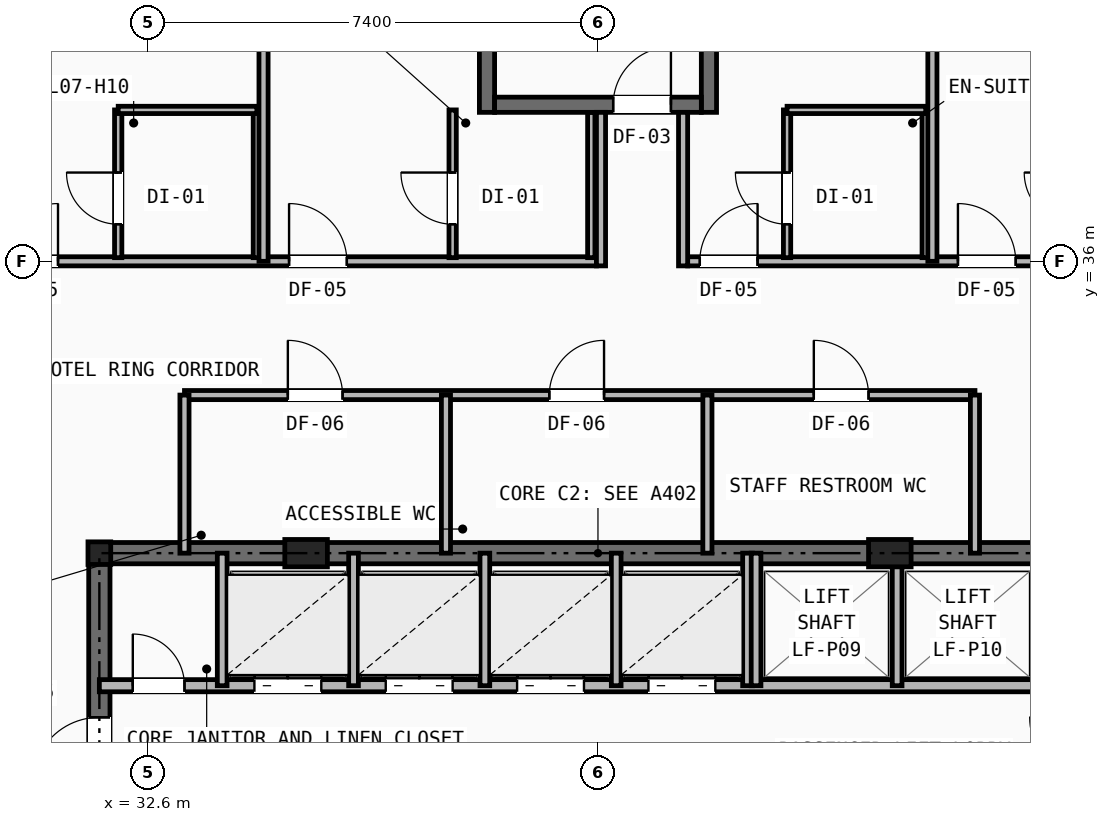
"""IFC4 building model, lengths in metres.
Left out: names, types, materials, properties, quantities, classifications, styles, units other than length and angle.
Written with IfcOpenShell. Run it as: python <this file> out.ifc"""

import sys

from ifc_helpers import new_model, si_unit, direction, frame, frame_2d, origin, origin_2d, place, context, subcontext, project, spatial, rectangle, i_section, extrude, element, fill, save


model = new_model("IFC4")
c1 = context("Model", 3, precision=1e-05, world=origin(), true_north=direction((0.0, 1.0)))
c2 = subcontext(c1, "Body", "Model", "MODEL_VIEW")
j1 = project(units=[si_unit("LENGTHUNIT", "METRE"), si_unit("PLANEANGLEUNIT", "RADIAN")], contexts=[c1])
p1 = place(None, origin())
s1 = spatial("IfcSite", under=j1, at=p1, CompositionType="ELEMENT")
p2 = place(p1, origin())
s2 = spatial("IfcBuilding", under=s1, at=p2, CompositionType="ELEMENT")
p3 = place(p2, frame((0.0, 0.0, 30.4)))
s3 = spatial("IfcBuildingStorey", under=s2, at=p3, CompositionType="ELEMENT", Elevation=30.4)
p4 = place(p3, frame((31.8, 31.2, 0.0), z_axis=(0.0, 0.0, 1.0), x_axis=(1.0, 0.0, 0.0)))
e1 = element("IfcColumn", 1, at=p4, inside=s3, PredefinedType="COLUMN", context=c2, shape_type="SweptSolid", body=[
    extrude(i_section(OverallWidth=0.374, OverallDepth=0.372, WebThickness=0.016, FlangeThickness=0.026, at=origin_2d()), origin(), (0.0, 0.0, 1.0), 3.2),
])
for number, where, z_axis, x_axis in (
    (2, (35.2, 31.2, 0.0), (0.0, 0.0, 1.0), (1.0, 0.0, 0.0)),
    (3, (44.8, 31.2, 0.0), (0.0, 0.0, 1.0), (1.0, 0.0, 0.0)),
):
    element("IfcColumn", number, at=place(p3, frame(where, z_axis=z_axis, x_axis=x_axis)), inside=s3, PredefinedType="PILASTER", context=c2, shape_type="SweptSolid", body=[
        extrude(rectangle(XDim=0.7, YDim=0.45, at=origin_2d()), origin(), (0.0, 0.0, 1.0), 3.2),
    ])
p5 = place(p3, frame((31.8, 31.2, 0.0), z_axis=(0.0, 0.0, 1.0), x_axis=(1.0, 0.0, 0.0)))
e4 = element("IfcWall", 4, at=p5, inside=s3, PredefinedType="SHEAR", context=c2, shape_type="SweptSolid", body=[
    extrude(rectangle(XDim=16.4, YDim=0.35, at=frame_2d((8.2, 0.0))), origin(), (0.0, 0.0, 1.0), 2.98),
])
p6 = place(p3, frame((31.8, 16.4, 0.0), z_axis=(0.0, 0.0, 1.0), x_axis=(0.0, 1.0, 0.0)))
e5 = element("IfcWall", 5, at=p6, inside=s3, PredefinedType="SHEAR", context=c2, shape_type="SweptSolid", body=[
    extrude(rectangle(XDim=14.8, YDim=0.35, at=frame_2d((7.4, 0.0))), origin(), (0.0, 0.0, 1.0), 2.98),
])
p7 = place(p6, frame((11.0, 0.0, 0.0)))
e6 = element("IfcOpeningElement", 6, at=p7, cuts=e5, PredefinedType="OPENING", context=c2, shape_type="SweptSolid", body=[
    extrude(rectangle(XDim=1.1, YDim=2.15, at=frame_2d((0.55, 1.075))), frame((0.0, 0.185, 0.0), z_axis=(0.0, -1.0, 0.0), x_axis=(1.0, 0.0, 0.0)), (0.0, 0.0, 1.0), 0.37),
])
p8 = place(p3, frame((31.8, 29.02, 0.0), z_axis=(0.0, 0.0, 1.0), x_axis=(1.0, 0.0, 0.0)))
e7 = element("IfcWall", 7, at=p8, inside=s3, PredefinedType="SOLIDWALL", context=c2, shape_type="SweptSolid", body=[
    extrude(rectangle(XDim=16.4, YDim=0.2, at=frame_2d((8.2, 0.0))), origin(), (0.0, 0.0, 1.0), 2.431),
])
p9 = place(p8, frame((0.55, 0.0, 0.0)))
e8 = element("IfcOpeningElement", 8, at=p9, cuts=e7, PredefinedType="OPENING", context=c2, shape_type="SweptSolid", body=[
    extrude(rectangle(XDim=0.85, YDim=2.05, at=frame_2d((0.425, 1.025))), frame((0.0, 0.11, 0.0), z_axis=(0.0, -1.0, 0.0), x_axis=(1.0, 0.0, 0.0)), (0.0, 0.0, 1.0), 0.22),
])
p10 = place(p8, frame((2.55, 0.0, 0.0)))
e9 = element("IfcOpeningElement", 9, at=p10, cuts=e7, PredefinedType="OPENING", context=c2, shape_type="SweptSolid", body=[
    extrude(rectangle(XDim=1.1, YDim=2.15, at=frame_2d((0.55, 1.075))), frame((0.0, 0.11, 0.0), z_axis=(0.0, -1.0, 0.0), x_axis=(1.0, 0.0, 0.0)), (0.0, 0.0, 1.0), 0.22),
])
p11 = place(p8, frame((4.71, 0.0, 0.0)))
e10 = element("IfcOpeningElement", 10, at=p11, cuts=e7, PredefinedType="OPENING", context=c2, shape_type="SweptSolid", body=[
    extrude(rectangle(XDim=1.1, YDim=2.15, at=frame_2d((0.55, 1.075))), frame((0.0, 0.11, 0.0), z_axis=(0.0, -1.0, 0.0), x_axis=(1.0, 0.0, 0.0)), (0.0, 0.0, 1.0), 0.22),
])
p12 = place(p8, frame((6.87, 0.0, 0.0)))
e11 = element("IfcOpeningElement", 11, at=p12, cuts=e7, PredefinedType="OPENING", context=c2, shape_type="SweptSolid", body=[
    extrude(rectangle(XDim=1.1, YDim=2.15, at=frame_2d((0.55, 1.075))), frame((0.0, 0.11, 0.0), z_axis=(0.0, -1.0, 0.0), x_axis=(1.0, 0.0, 0.0)), (0.0, 0.0, 1.0), 0.22),
])
p13 = place(p8, frame((9.03, 0.0, 0.0)))
e12 = element("IfcOpeningElement", 12, at=p13, cuts=e7, PredefinedType="OPENING", context=c2, shape_type="SweptSolid", body=[
    extrude(rectangle(XDim=1.1, YDim=2.15, at=frame_2d((0.55, 1.075))), frame((0.0, 0.11, 0.0), z_axis=(0.0, -1.0, 0.0), x_axis=(1.0, 0.0, 0.0)), (0.0, 0.0, 1.0), 0.22),
])
for number, where, z_axis, x_axis in (
    (13, (33.82, 29.02, 0.0), (0.0, 0.0, 1.0), (0.0, 1.0, 0.0)),
    (14, (35.98, 29.02, 0.0), (0.0, 0.0, 1.0), (0.0, 1.0, 0.0)),
    (15, (38.14, 29.02, 0.0), (0.0, 0.0, 1.0), (0.0, 1.0, 0.0)),
    (16, (40.3, 29.02, 0.0), (0.0, 0.0, 1.0), (0.0, 1.0, 0.0)),
    (17, (42.46, 29.02, 0.0), (0.0, 0.0, 1.0), (0.0, 1.0, 0.0)),
    (18, (42.6, 29.02, 0.0), (0.0, 0.0, 1.0), (0.0, 1.0, 0.0)),
    (19, (44.92, 29.02, 0.0), (0.0, 0.0, 1.0), (0.0, 1.0, 0.0)),
):
    element("IfcWall", number, at=place(p3, frame(where, z_axis=z_axis, x_axis=x_axis)), inside=s3, PredefinedType="SOLIDWALL", context=c2, shape_type="SweptSolid", body=[
        extrude(rectangle(XDim=2.18, YDim=0.16, at=frame_2d((1.09, 0.0))), origin(), (0.0, 0.0, 1.0), 2.431),
    ])
p14 = place(p3, frame((33.2, 33.8, 0.0), z_axis=(0.0, 0.0, 1.0), x_axis=(1.0, 0.0, 0.0)))
e20 = element("IfcWall", 20, at=p14, inside=s3, PredefinedType="PARTITIONING", context=c2, shape_type="SweptSolid", body=[
    extrude(rectangle(XDim=13.0, YDim=0.15, at=frame_2d((6.5, 0.0))), origin(), (0.0, 0.0, 1.0), 2.98),
])
p15 = place(p14, frame((1.7, 0.0, 0.0)))
e21 = element("IfcOpeningElement", 21, at=p15, cuts=e20, PredefinedType="OPENING", context=c2, shape_type="SweptSolid", body=[
    extrude(rectangle(XDim=0.9, YDim=2.1, at=frame_2d((0.45, 1.05))), frame((0.0, 0.085, 0.0), z_axis=(0.0, -1.0, 0.0), x_axis=(1.0, 0.0, 0.0)), (0.0, 0.0, 1.0), 0.17),
])
p16 = place(p14, frame((6.0, 0.0, 0.0)))
e22 = element("IfcOpeningElement", 22, at=p16, cuts=e20, PredefinedType="OPENING", context=c2, shape_type="SweptSolid", body=[
    extrude(rectangle(XDim=0.9, YDim=2.1, at=frame_2d((0.45, 1.05))), frame((0.0, 0.085, 0.0), z_axis=(0.0, -1.0, 0.0), x_axis=(1.0, 0.0, 0.0)), (0.0, 0.0, 1.0), 0.17),
])
p17 = place(p14, frame((10.35, 0.0, 0.0)))
e23 = element("IfcOpeningElement", 23, at=p17, cuts=e20, PredefinedType="OPENING", context=c2, shape_type="SweptSolid", body=[
    extrude(rectangle(XDim=0.9, YDim=2.1, at=frame_2d((0.45, 1.05))), frame((0.0, 0.085, 0.0), z_axis=(0.0, -1.0, 0.0), x_axis=(1.0, 0.0, 0.0)), (0.0, 0.0, 1.0), 0.17),
])
for number, where, z_axis, x_axis in (
    (24, (33.2, 31.2, 0.0), (0.0, 0.0, 1.0), (0.0, 1.0, 0.0)),
    (25, (46.2, 31.2, 0.0), (0.0, 0.0, 1.0), (0.0, 1.0, 0.0)),
    (26, (37.5, 31.2, 0.0), (0.0, 0.0, 1.0), (0.0, 1.0, 0.0)),
    (27, (41.8, 31.2, 0.0), (0.0, 0.0, 1.0), (0.0, 1.0, 0.0)),
):
    element("IfcWall", number, at=place(p3, frame(where, z_axis=z_axis, x_axis=x_axis)), inside=s3, PredefinedType="PARTITIONING", context=c2, shape_type="SweptSolid", body=[
        extrude(rectangle(XDim=2.6, YDim=0.15, at=frame_2d((1.3, 0.0))), origin(), (0.0, 0.0, 1.0), 2.431),
    ])
p18 = place(p3, frame((29.6, 36.0, 0.0), z_axis=(0.0, 0.0, 1.0), x_axis=(1.0, 0.0, 0.0)))
e28 = element("IfcWall", 28, at=p18, inside=s3, PredefinedType="PARTITIONING", context=c2, shape_type="SweptSolid", body=[
    extrude(rectangle(XDim=10.375, YDim=0.15, at=frame_2d((5.188, 0.0))), origin(), (0.0, 0.0, 1.0), 2.98),
])
p19 = place(p18, frame((0.57, 0.0, 0.0)))
e29 = element("IfcOpeningElement", 29, at=p19, cuts=e28, PredefinedType="OPENING", context=c2, shape_type="SweptSolid", body=[
    extrude(rectangle(XDim=0.95, YDim=2.1, at=frame_2d((0.475, 1.05))), frame((0.0, 0.085, 0.0), z_axis=(0.0, -1.0, 0.0), x_axis=(1.0, 0.0, 0.0)), (0.0, 0.0, 1.0), 0.17),
])
p20 = place(p18, frame((5.32, 0.0, 0.0)))
e30 = element("IfcOpeningElement", 30, at=p20, cuts=e28, PredefinedType="OPENING", context=c2, shape_type="SweptSolid", body=[
    extrude(rectangle(XDim=0.95, YDim=2.1, at=frame_2d((0.475, 1.05))), frame((0.0, 0.085, 0.0), z_axis=(0.0, -1.0, 0.0), x_axis=(1.0, 0.0, 0.0)), (0.0, 0.0, 1.0), 0.17),
])
p21 = place(p3, frame((41.475, 36.0, 0.0), z_axis=(0.0, 0.0, 1.0), x_axis=(1.0, 0.0, 0.0)))
e31 = element("IfcWall", 31, at=p21, inside=s3, PredefinedType="PARTITIONING", context=c2, shape_type="SweptSolid", body=[
    extrude(rectangle(XDim=8.925, YDim=0.15, at=frame_2d((4.462, 0.0))), origin(), (0.0, 0.0, 1.0), 2.513),
])
p22 = place(p21, frame((0.2, 0.0, 0.0)))
e32 = element("IfcOpeningElement", 32, at=p22, cuts=e31, PredefinedType="OPENING", context=c2, shape_type="SweptSolid", body=[
    extrude(rectangle(XDim=0.95, YDim=2.1, at=frame_2d((0.475, 1.05))), frame((0.0, 0.085, 0.0), z_axis=(0.0, -1.0, 0.0), x_axis=(1.0, 0.0, 0.0)), (0.0, 0.0, 1.0), 0.17),
])
p23 = place(p21, frame((4.445, 0.0, 0.0)))
e33 = element("IfcOpeningElement", 33, at=p23, cuts=e31, PredefinedType="OPENING", context=c2, shape_type="SweptSolid", body=[
    extrude(rectangle(XDim=0.95, YDim=2.1, at=frame_2d((0.475, 1.05))), frame((0.0, 0.085, 0.0), z_axis=(0.0, -1.0, 0.0), x_axis=(1.0, 0.0, 0.0)), (0.0, 0.0, 1.0), 0.17),
])
p24 = place(p3, frame((32.11, 36.06, 0.0), z_axis=(0.0, 0.0, 1.0), x_axis=(0.0, 1.0, 0.0)))
e34 = element("IfcWall", 34, at=p24, inside=s3, PredefinedType="PARTITIONING", context=c2, shape_type="SweptSolid", body=[
    extrude(rectangle(XDim=2.43, YDim=0.12, at=frame_2d((1.215, 0.0))), origin(), (0.0, 0.0, 1.0), 2.98),
])
p25 = place(p24, frame((0.55, 0.0, 0.0)))
e35 = element("IfcOpeningElement", 35, at=p25, cuts=e34, PredefinedType="OPENING", context=c2, shape_type="SweptSolid", body=[
    extrude(rectangle(XDim=0.85, YDim=2.05, at=frame_2d((0.425, 1.025))), frame((0.0, 0.07, 0.0), z_axis=(0.0, -1.0, 0.0), x_axis=(1.0, 0.0, 0.0)), (0.0, 0.0, 1.0), 0.14),
])
p26 = place(p3, frame((34.39, 36.06, 0.0), z_axis=(0.0, 0.0, 1.0), x_axis=(0.0, 1.0, 0.0)))
e36 = element("IfcWall", 36, at=p26, inside=s3, PredefinedType="PARTITIONING", context=c2, shape_type="SweptSolid", body=[
    extrude(rectangle(XDim=2.43, YDim=0.12, at=frame_2d((1.215, 0.0))), origin(), (0.0, 0.0, 1.0), 2.98),
])
p27 = place(p3, frame((32.11, 38.49, 0.0), z_axis=(0.0, 0.0, 1.0), x_axis=(1.0, 0.0, 0.0)))
e37 = element("IfcWall", 37, at=p27, inside=s3, PredefinedType="PARTITIONING", context=c2, shape_type="SweptSolid", body=[
    extrude(rectangle(XDim=2.28, YDim=0.12, at=frame_2d((1.14, 0.0))), origin(), (0.0, 0.0, 1.0), 2.98),
])
p28 = place(p3, frame((34.5, 36.0, 0.0), z_axis=(0.0, 0.0, 1.0), x_axis=(0.0, 1.0, 0.0)))
e38 = element("IfcWall", 38, at=p28, inside=s3, PredefinedType="PARTITIONING", context=c2, shape_type="SweptSolid", body=[
    extrude(rectangle(XDim=17.66, YDim=0.15, at=frame_2d((8.83, 0.0))), origin(), (0.0, 0.0, 1.0), 2.268),
])
p29 = place(p3, frame((37.61, 36.06, 0.0), z_axis=(0.0, 0.0, 1.0), x_axis=(0.0, 1.0, 0.0)))
e39 = element("IfcWall", 39, at=p29, inside=s3, PredefinedType="PARTITIONING", context=c2, shape_type="SweptSolid", body=[
    extrude(rectangle(XDim=2.43, YDim=0.12, at=frame_2d((1.215, 0.0))), origin(), (0.0, 0.0, 1.0), 2.98),
])
p30 = place(p29, frame((0.55, 0.0, 0.0)))
e40 = element("IfcOpeningElement", 40, at=p30, cuts=e39, PredefinedType="OPENING", context=c2, shape_type="SweptSolid", body=[
    extrude(rectangle(XDim=0.85, YDim=2.05, at=frame_2d((0.425, 1.025))), frame((0.0, 0.07, 0.0), z_axis=(0.0, -1.0, 0.0), x_axis=(1.0, 0.0, 0.0)), (0.0, 0.0, 1.0), 0.14),
])
p31 = place(p3, frame((39.89, 36.06, 0.0), z_axis=(0.0, 0.0, 1.0), x_axis=(0.0, 1.0, 0.0)))
e41 = element("IfcWall", 41, at=p31, inside=s3, PredefinedType="PARTITIONING", context=c2, shape_type="SweptSolid", body=[
    extrude(rectangle(XDim=2.39, YDim=0.12, at=frame_2d((1.195, 0.0))), origin(), (0.0, 0.0, 1.0), 2.98),
])
p32 = place(p3, frame((43.11, 36.06, 0.0), z_axis=(0.0, 0.0, 1.0), x_axis=(0.0, 1.0, 0.0)))
e42 = element("IfcWall", 42, at=p32, inside=s3, PredefinedType="PARTITIONING", context=c2, shape_type="SweptSolid", body=[
    extrude(rectangle(XDim=2.43, YDim=0.12, at=frame_2d((1.215, 0.0))), origin(), (0.0, 0.0, 1.0), 2.98),
])
p33 = place(p32, frame((0.55, 0.0, 0.0)))
e43 = element("IfcOpeningElement", 43, at=p33, cuts=e42, PredefinedType="OPENING", context=c2, shape_type="SweptSolid", body=[
    extrude(rectangle(XDim=0.85, YDim=2.05, at=frame_2d((0.425, 1.025))), frame((0.0, 0.07, 0.0), z_axis=(0.0, -1.0, 0.0), x_axis=(1.0, 0.0, 0.0)), (0.0, 0.0, 1.0), 0.14),
])
p34 = place(p3, frame((45.39, 36.06, 0.0), z_axis=(0.0, 0.0, 1.0), x_axis=(0.0, 1.0, 0.0)))
e44 = element("IfcWall", 44, at=p34, inside=s3, PredefinedType="PARTITIONING", context=c2, shape_type="SweptSolid", body=[
    extrude(rectangle(XDim=2.43, YDim=0.12, at=frame_2d((1.215, 0.0))), origin(), (0.0, 0.0, 1.0), 2.98),
])
p35 = place(p3, frame((43.11, 38.49, 0.0), z_axis=(0.0, 0.0, 1.0), x_axis=(1.0, 0.0, 0.0)))
e45 = element("IfcWall", 45, at=p35, inside=s3, PredefinedType="PARTITIONING", context=c2, shape_type="SweptSolid", body=[
    extrude(rectangle(XDim=2.28, YDim=0.12, at=frame_2d((1.14, 0.0))), origin(), (0.0, 0.0, 1.0), 2.98),
])
p36 = place(p3, frame((45.5, 36.0, 0.0), z_axis=(0.0, 0.0, 1.0), x_axis=(0.0, 1.0, 0.0)))
e46 = element("IfcWall", 46, at=p36, inside=s3, PredefinedType="PARTITIONING", context=c2, shape_type="SweptSolid", body=[
    extrude(rectangle(XDim=17.66, YDim=0.15, at=frame_2d((8.83, 0.0))), origin(), (0.0, 0.0, 1.0), 2.268),
])
for number, where, z_axis, x_axis in (
    (47, (38.175, 38.45, 0.0), (0.0, 0.0, 1.0), (0.0, 1.0, 0.0)),
    (48, (41.825, 38.45, 0.0), (0.0, 0.0, 1.0), (0.0, 1.0, 0.0)),
):
    element("IfcWall", number, at=place(p3, frame(where, z_axis=z_axis, x_axis=x_axis)), inside=s3, PredefinedType="SHEAR", context=c2, shape_type="SweptSolid", body=[
        extrude(rectangle(XDim=8.55, YDim=0.25, at=frame_2d((4.275, 0.0))), origin(), (0.0, 0.0, 1.0), 2.98),
    ])
p37 = place(p3, frame((38.3, 38.575, 0.0), z_axis=(0.0, 0.0, 1.0), x_axis=(1.0, 0.0, 0.0)))
e49 = element("IfcWall", 49, at=p37, inside=s3, PredefinedType="SHEAR", context=c2, shape_type="SweptSolid", body=[
    extrude(rectangle(XDim=3.4, YDim=0.25, at=frame_2d((1.7, 0.0))), origin(), (0.0, 0.0, 1.0), 2.98),
])
p38 = place(p37, frame((1.95, 0.0, 0.0)))
e50 = element("IfcOpeningElement", 50, at=p38, cuts=e49, PredefinedType="OPENING", context=c2, shape_type="SweptSolid", body=[
    extrude(rectangle(XDim=0.95, YDim=2.1, at=frame_2d((0.475, 1.05))), frame((0.0, 0.135, 0.0), z_axis=(0.0, -1.0, 0.0), x_axis=(1.0, 0.0, 0.0)), (0.0, 0.0, 1.0), 0.27),
])
for number, where, z_axis, x_axis in (
    (51, (40.05, 35.925, 0.0), (0.0, 0.0, 1.0), (0.0, 1.0, 0.0)),
    (52, (41.4, 35.925, 0.0), (0.0, 0.0, 1.0), (0.0, 1.0, 0.0)),
):
    element("IfcWall", number, at=place(p3, frame(where, z_axis=z_axis, x_axis=x_axis)), inside=s3, PredefinedType="PARTITIONING", context=c2, shape_type="SweptSolid", body=[
        extrude(rectangle(XDim=2.525, YDim=0.15, at=frame_2d((1.262, 0.0))), origin(), (0.0, 0.0, 1.0), 2.98),
    ])
p39 = place(p9, origin())
e53 = element("IfcDoor", 53, at=p39, inside=s3, OperationType="SINGLE_SWING_LEFT", PredefinedType="DOOR", context=c2, shape_type="SweptSolid", body=[
    extrude(rectangle(XDim=0.85, YDim=2.05, at=frame_2d((0.425, 1.025))), frame((0.0, 0.025, 0.0), z_axis=(0.0, -1.0, 0.0), x_axis=(1.0, 0.0, 0.0)), (0.0, 0.0, 1.0), 0.05),
])
fill(e8, e53)
p40 = place(p7, origin())
e54 = element("IfcDoor", 54, at=p40, inside=s3, OperationType="SINGLE_SWING_LEFT", PredefinedType="DOOR", context=c2, shape_type="SweptSolid", body=[
    extrude(rectangle(XDim=1.1, YDim=2.15, at=frame_2d((0.55, 1.075))), frame((0.0, 0.025, 0.0), z_axis=(0.0, -1.0, 0.0), x_axis=(1.0, 0.0, 0.0)), (0.0, 0.0, 1.0), 0.05),
])
fill(e6, e54)
p41 = place(p10, origin())
e55 = element("IfcDoor", 55, at=p41, inside=s3, OperationType="DOUBLE_DOOR_SLIDING", PredefinedType="DOOR", context=c2, shape_type="SweptSolid", body=[
    extrude(rectangle(XDim=1.1, YDim=2.15, at=frame_2d((0.55, 1.075))), frame((0.0, 0.025, 0.0), z_axis=(0.0, -1.0, 0.0), x_axis=(1.0, 0.0, 0.0)), (0.0, 0.0, 1.0), 0.05),
])
fill(e9, e55)
p42 = place(p11, origin())
e56 = element("IfcDoor", 56, at=p42, inside=s3, OperationType="DOUBLE_DOOR_SLIDING", PredefinedType="DOOR", context=c2, shape_type="SweptSolid", body=[
    extrude(rectangle(XDim=1.1, YDim=2.15, at=frame_2d((0.55, 1.075))), frame((0.0, 0.025, 0.0), z_axis=(0.0, -1.0, 0.0), x_axis=(1.0, 0.0, 0.0)), (0.0, 0.0, 1.0), 0.05),
])
fill(e10, e56)
p43 = place(p12, origin())
e57 = element("IfcDoor", 57, at=p43, inside=s3, OperationType="DOUBLE_DOOR_SLIDING", PredefinedType="DOOR", context=c2, shape_type="SweptSolid", body=[
    extrude(rectangle(XDim=1.1, YDim=2.15, at=frame_2d((0.55, 1.075))), frame((0.0, 0.025, 0.0), z_axis=(0.0, -1.0, 0.0), x_axis=(1.0, 0.0, 0.0)), (0.0, 0.0, 1.0), 0.05),
])
fill(e11, e57)
p44 = place(p13, origin())
e58 = element("IfcDoor", 58, at=p44, inside=s3, OperationType="DOUBLE_DOOR_SLIDING", PredefinedType="DOOR", context=c2, shape_type="SweptSolid", body=[
    extrude(rectangle(XDim=1.1, YDim=2.15, at=frame_2d((0.55, 1.075))), frame((0.0, 0.025, 0.0), z_axis=(0.0, -1.0, 0.0), x_axis=(1.0, 0.0, 0.0)), (0.0, 0.0, 1.0), 0.05),
])
fill(e12, e58)
p45 = place(p15, origin())
e59 = element("IfcDoor", 59, at=p45, inside=s3, OperationType="SINGLE_SWING_LEFT", PredefinedType="DOOR", context=c2, shape_type="SweptSolid", body=[
    extrude(rectangle(XDim=0.9, YDim=2.1, at=frame_2d((0.45, 1.05))), frame((0.0, 0.025, 0.0), z_axis=(0.0, -1.0, 0.0), x_axis=(1.0, 0.0, 0.0)), (0.0, 0.0, 1.0), 0.05),
])
fill(e21, e59)
p46 = place(p16, origin())
e60 = element("IfcDoor", 60, at=p46, inside=s3, OperationType="SINGLE_SWING_RIGHT", PredefinedType="DOOR", context=c2, shape_type="SweptSolid", body=[
    extrude(rectangle(XDim=0.9, YDim=2.1, at=frame_2d((0.45, 1.05))), frame((0.0, 0.025, 0.0), z_axis=(0.0, -1.0, 0.0), x_axis=(1.0, 0.0, 0.0)), (0.0, 0.0, 1.0), 0.05),
])
fill(e22, e60)
p47 = place(p17, origin())
e61 = element("IfcDoor", 61, at=p47, inside=s3, OperationType="SINGLE_SWING_LEFT", PredefinedType="DOOR", context=c2, shape_type="SweptSolid", body=[
    extrude(rectangle(XDim=0.9, YDim=2.1, at=frame_2d((0.45, 1.05))), frame((0.0, 0.025, 0.0), z_axis=(0.0, -1.0, 0.0), x_axis=(1.0, 0.0, 0.0)), (0.0, 0.0, 1.0), 0.05),
])
fill(e23, e61)
p48 = place(p19, origin())
e62 = element("IfcDoor", 62, at=p48, inside=s3, OperationType="SINGLE_SWING_RIGHT", PredefinedType="DOOR", context=c2, shape_type="SweptSolid", body=[
    extrude(rectangle(XDim=0.95, YDim=2.1, at=frame_2d((0.475, 1.05))), frame((0.0, 0.025, 0.0), z_axis=(0.0, -1.0, 0.0), x_axis=(1.0, 0.0, 0.0)), (0.0, 0.0, 1.0), 0.05),
])
fill(e29, e62)
p49 = place(p25, origin())
e63 = element("IfcDoor", 63, at=p49, inside=s3, OperationType="SINGLE_SWING_RIGHT", PredefinedType="DOOR", context=c2, shape_type="SweptSolid", body=[
    extrude(rectangle(XDim=0.85, YDim=2.05, at=frame_2d((0.425, 1.025))), frame((0.0, 0.025, 0.0), z_axis=(0.0, -1.0, 0.0), x_axis=(1.0, 0.0, 0.0)), (0.0, 0.0, 1.0), 0.05),
])
fill(e35, e63)
p50 = place(p20, origin())
e64 = element("IfcDoor", 64, at=p50, inside=s3, OperationType="SINGLE_SWING_LEFT", PredefinedType="DOOR", context=c2, shape_type="SweptSolid", body=[
    extrude(rectangle(XDim=0.95, YDim=2.1, at=frame_2d((0.475, 1.05))), frame((0.0, 0.025, 0.0), z_axis=(0.0, -1.0, 0.0), x_axis=(1.0, 0.0, 0.0)), (0.0, 0.0, 1.0), 0.05),
])
fill(e30, e64)
p51 = place(p30, origin())
e65 = element("IfcDoor", 65, at=p51, inside=s3, OperationType="SINGLE_SWING_RIGHT", PredefinedType="DOOR", context=c2, shape_type="SweptSolid", body=[
    extrude(rectangle(XDim=0.85, YDim=2.05, at=frame_2d((0.425, 1.025))), frame((0.0, 0.025, 0.0), z_axis=(0.0, -1.0, 0.0), x_axis=(1.0, 0.0, 0.0)), (0.0, 0.0, 1.0), 0.05),
])
fill(e40, e65)
p52 = place(p22, origin())
e66 = element("IfcDoor", 66, at=p52, inside=s3, OperationType="SINGLE_SWING_RIGHT", PredefinedType="DOOR", context=c2, shape_type="SweptSolid", body=[
    extrude(rectangle(XDim=0.95, YDim=2.1, at=frame_2d((0.475, 1.05))), frame((0.0, 0.025, 0.0), z_axis=(0.0, -1.0, 0.0), x_axis=(1.0, 0.0, 0.0)), (0.0, 0.0, 1.0), 0.05),
])
fill(e32, e66)
p53 = place(p33, origin())
e67 = element("IfcDoor", 67, at=p53, inside=s3, OperationType="SINGLE_SWING_RIGHT", PredefinedType="DOOR", context=c2, shape_type="SweptSolid", body=[
    extrude(rectangle(XDim=0.85, YDim=2.05, at=frame_2d((0.425, 1.025))), frame((0.0, 0.025, 0.0), z_axis=(0.0, -1.0, 0.0), x_axis=(1.0, 0.0, 0.0)), (0.0, 0.0, 1.0), 0.05),
])
fill(e43, e67)
p54 = place(p23, origin())
e68 = element("IfcDoor", 68, at=p54, inside=s3, OperationType="SINGLE_SWING_LEFT", PredefinedType="DOOR", context=c2, shape_type="SweptSolid", body=[
    extrude(rectangle(XDim=0.95, YDim=2.1, at=frame_2d((0.475, 1.05))), frame((0.0, 0.025, 0.0), z_axis=(0.0, -1.0, 0.0), x_axis=(1.0, 0.0, 0.0)), (0.0, 0.0, 1.0), 0.05),
])
fill(e33, e68)
p55 = place(p38, origin())
e69 = element("IfcDoor", 69, at=p55, inside=s3, OperationType="SINGLE_SWING_RIGHT", PredefinedType="DOOR", context=c2, shape_type="SweptSolid", body=[
    extrude(rectangle(XDim=0.95, YDim=2.1, at=frame_2d((0.475, 1.05))), frame((0.0, 0.025, 0.0), z_axis=(0.0, -1.0, 0.0), x_axis=(1.0, 0.0, 0.0)), (0.0, 0.0, 1.0), 0.05),
])
fill(e50, e69)
save(model, sys.argv[1])
